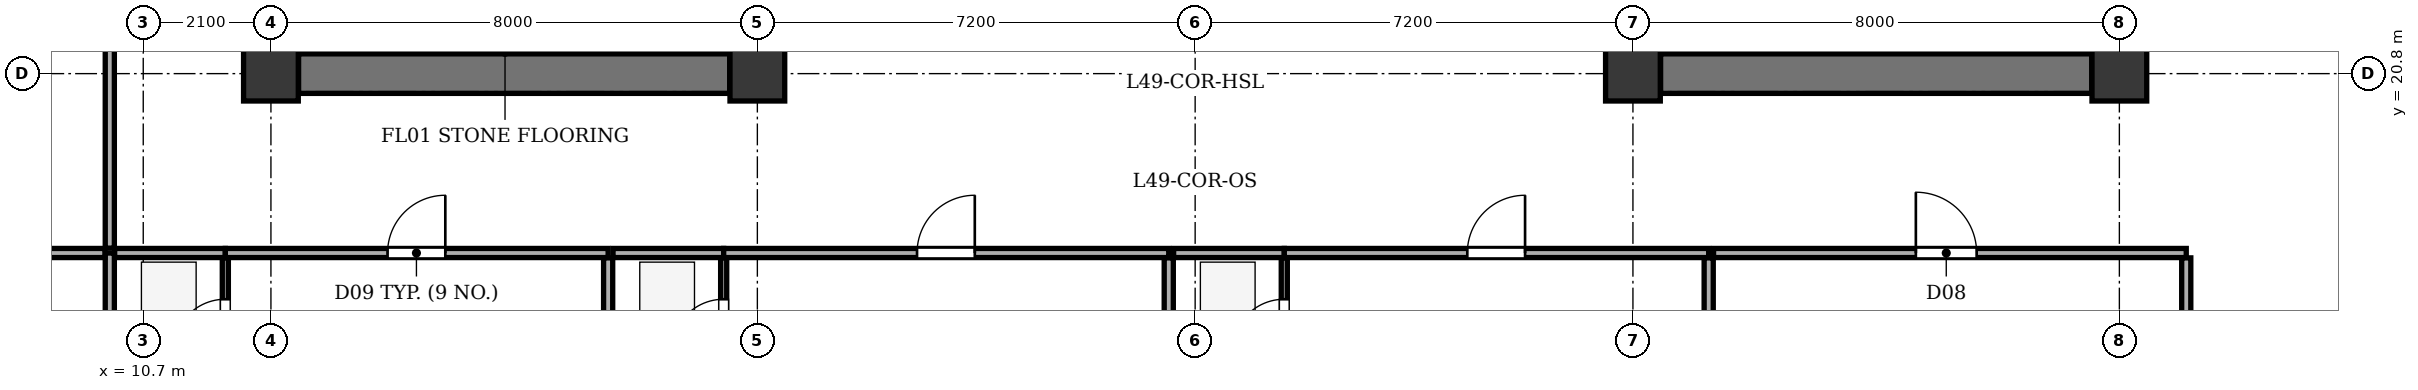
"""IFC4 building model, lengths in metres.
Left out: names, types, materials, properties, quantities, classifications, styles, units other than length and angle.
Written with IfcOpenShell. Run it as: python <this file> out.ifc"""

import sys

from ifc_helpers import new_model, si_unit, direction, frame, frame_2d, origin, origin_2d, place, context, subcontext, project, spatial, rectangle, extrude, element, fill, save


model = new_model("IFC4")
c1 = context("Model", 3, precision=1e-05, world=origin(), true_north=direction((0.0, 1.0)))
c2 = subcontext(c1, "Body", "Model", "MODEL_VIEW")
j1 = project(units=[si_unit("LENGTHUNIT", "METRE"), si_unit("PLANEANGLEUNIT", "RADIAN")], contexts=[c1])
p1 = place(None, origin())
s1 = spatial("IfcSite", under=j1, at=p1, CompositionType="ELEMENT")
p2 = place(p1, origin())
s2 = spatial("IfcBuilding", under=s1, at=p2, CompositionType="ELEMENT")
p3 = place(p2, frame((0.0, 0.0, 190.3)))
s3 = spatial("IfcBuildingStorey", under=s2, at=p3, CompositionType="ELEMENT", Elevation=190.3)
for number, where, z_axis, x_axis in (
    (1, (12.8, 20.8, 0.0), (0.0, 0.0, 1.0), (1.0, 0.0, 0.0)),
    (2, (20.8, 20.8, 0.0), (0.0, 0.0, 1.0), (1.0, 0.0, 0.0)),
    (3, (35.2, 20.8, 0.0), (0.0, 0.0, 1.0), (1.0, 0.0, 0.0)),
    (4, (43.2, 20.8, 0.0), (0.0, 0.0, 1.0), (1.0, 0.0, 0.0)),
):
    element("IfcColumn", number, at=place(p3, frame(where, z_axis=z_axis, x_axis=x_axis)), inside=s3, PredefinedType="COLUMN", context=c2, shape_type="SweptSolid", body=[
        extrude(rectangle(XDim=0.9, YDim=0.9, at=origin_2d()), origin(), (0.0, 0.0, 1.0), 3.5),
    ])
p4 = place(p3, frame((13.255, 20.8, 0.0), z_axis=(0.0, 0.0, 1.0), x_axis=(1.0, 0.0, 0.0)))
e5 = element("IfcWall", 5, at=p4, inside=s3, PredefinedType="SHEAR", context=c2, shape_type="SweptSolid", body=[
    extrude(rectangle(XDim=7.09, YDim=0.65, at=frame_2d((3.545, 0.0))), origin(), (0.0, 0.0, 1.0), 3.2),
])
p5 = place(p3, frame((16.435, 21.135, 0.0), z_axis=(0.0, 0.0, 1.0), x_axis=(0.0, 1.0, 0.0)))
e6 = element("IfcWall", 6, at=p5, inside=s3, PredefinedType="SHEAR", context=c2, shape_type="SweptSolid", body=[
    extrude(rectangle(XDim=12.13, YDim=0.25, at=frame_2d((6.065, 0.0))), origin(), (0.0, 0.0, 1.0), 3.2),
])
p6 = place(p5, frame((0.515, 0.0, 0.0)))
e7 = element("IfcOpeningElement", 7, at=p6, cuts=e6, PredefinedType="OPENING", context=c2, shape_type="SweptSolid", body=[
    extrude(rectangle(XDim=1.2, YDim=2.15, at=frame_2d((0.6, 1.075))), frame((0.0, 0.135, 0.0), z_axis=(0.0, -1.0, 0.0), x_axis=(1.0, 0.0, 0.0)), (0.0, 0.0, 1.0), 0.27),
])
p7 = place(p5, frame((2.665, 0.0, 0.0)))
e8 = element("IfcOpeningElement", 8, at=p7, cuts=e6, PredefinedType="OPENING", context=c2, shape_type="SweptSolid", body=[
    extrude(rectangle(XDim=1.15, YDim=2.15, at=frame_2d((0.575, 1.075))), frame((0.0, 0.135, 0.0), z_axis=(0.0, -1.0, 0.0), x_axis=(1.0, 0.0, 0.0)), (0.0, 0.0, 1.0), 0.27),
])
p8 = place(p3, frame((35.655, 20.8, 0.0), z_axis=(0.0, 0.0, 1.0), x_axis=(1.0, 0.0, 0.0)))
e9 = element("IfcWall", 9, at=p8, inside=s3, PredefinedType="SHEAR", context=c2, shape_type="SweptSolid", body=[
    extrude(rectangle(XDim=7.09, YDim=0.65, at=frame_2d((3.545, 0.0))), origin(), (0.0, 0.0, 1.0), 3.2),
])
p9 = place(p3, frame((39.565, 21.135, 0.0), z_axis=(0.0, 0.0, 1.0), x_axis=(0.0, 1.0, 0.0)))
e10 = element("IfcWall", 10, at=p9, inside=s3, PredefinedType="SHEAR", context=c2, shape_type="SweptSolid", body=[
    extrude(rectangle(XDim=12.13, YDim=0.25, at=frame_2d((6.065, 0.0))), origin(), (0.0, 0.0, 1.0), 3.2),
])
p10 = place(p9, frame((0.515, 0.0, 0.0)))
e11 = element("IfcOpeningElement", 11, at=p10, cuts=e10, PredefinedType="OPENING", context=c2, shape_type="SweptSolid", body=[
    extrude(rectangle(XDim=1.2, YDim=2.15, at=frame_2d((0.6, 1.075))), frame((0.0, 0.135, 0.0), z_axis=(0.0, -1.0, 0.0), x_axis=(1.0, 0.0, 0.0)), (0.0, 0.0, 1.0), 0.27),
])
p11 = place(p9, frame((2.665, 0.0, 0.0)))
e12 = element("IfcOpeningElement", 12, at=p11, cuts=e10, PredefinedType="OPENING", context=c2, shape_type="SweptSolid", body=[
    extrude(rectangle(XDim=1.15, YDim=2.15, at=frame_2d((0.575, 1.075))), frame((0.0, 0.135, 0.0), z_axis=(0.0, -1.0, 0.0), x_axis=(1.0, 0.0, 0.0)), (0.0, 0.0, 1.0), 0.27),
])
p12 = place(p3, frame((10.15, 8.275, 0.0), z_axis=(0.0, 0.0, 1.0), x_axis=(0.0, 1.0, 0.0)))
e13 = element("IfcWall", 13, at=p12, inside=s3, PredefinedType="PARTITIONING", context=c2, shape_type="SweptSolid", body=[
    extrude(rectangle(XDim=9.575, YDim=0.15, at=frame_2d((4.788, 0.0))), origin(), (0.0, 0.0, 1.0), 3.2),
])
p13 = place(p3, frame((10.23, 17.85, 0.0), z_axis=(0.0, 0.0, 1.0), x_axis=(1.0, 0.0, 0.0)))
e14 = element("IfcWall", 14, at=p13, inside=s3, PredefinedType="PARTITIONING", context=c2, shape_type="SweptSolid", body=[
    extrude(rectangle(XDim=1.82, YDim=0.15, at=frame_2d((0.91, 0.0))), origin(), (0.0, 0.0, 1.0), 3.2),
])
p14 = place(p3, frame((12.05, 17.85, 0.0), z_axis=(0.0, 0.0, 1.0), x_axis=(1.0, 0.0, 0.0)))
e15 = element("IfcWall", 15, at=p14, inside=s3, PredefinedType="PARTITIONING", context=c2, shape_type="SweptSolid", body=[
    extrude(rectangle(XDim=6.296, YDim=0.15, at=frame_2d((3.148, 0.0))), origin(), (0.0, 0.0, 1.0), 3.2),
])
p15 = place(p14, frame((2.668, 0.0, 0.0)))
e16 = element("IfcOpeningElement", 16, at=p15, cuts=e15, PredefinedType="OPENING", context=c2, shape_type="SweptSolid", body=[
    extrude(rectangle(XDim=0.95, YDim=2.1, at=frame_2d((0.475, 1.05))), frame((0.0, 0.085, 0.0), z_axis=(0.0, -1.0, 0.0), x_axis=(1.0, 0.0, 0.0)), (0.0, 0.0, 1.0), 0.17),
])
p16 = place(p3, frame((12.05, 15.52, 0.0), z_axis=(0.0, 0.0, 1.0), x_axis=(0.0, 1.0, 0.0)))
e17 = element("IfcWall", 17, at=p16, inside=s3, PredefinedType="PARTITIONING", context=c2, shape_type="SweptSolid", body=[
    extrude(rectangle(XDim=2.25, YDim=0.1, at=frame_2d((1.125, 0.0))), origin(), (0.0, 0.0, 1.0), 3.2),
])
p17 = place(p16, frame((0.72, 0.0, 0.0)))
e18 = element("IfcOpeningElement", 18, at=p17, cuts=e17, PredefinedType="OPENING", context=c2, shape_type="SweptSolid", body=[
    extrude(rectangle(XDim=0.85, YDim=2.05, at=frame_2d((0.425, 1.025))), frame((0.0, 0.06, 0.0), z_axis=(0.0, -1.0, 0.0), x_axis=(1.0, 0.0, 0.0)), (0.0, 0.0, 1.0), 0.12),
])
p18 = place(p3, frame((18.346, 8.275, 0.0), z_axis=(0.0, 0.0, 1.0), x_axis=(0.0, 1.0, 0.0)))
e19 = element("IfcWall", 19, at=p18, inside=s3, PredefinedType="PARTITIONING", context=c2, shape_type="SweptSolid", body=[
    extrude(rectangle(XDim=9.495, YDim=0.15, at=frame_2d((4.748, 0.0))), origin(), (0.0, 0.0, 1.0), 3.2),
])
p19 = place(p3, frame((18.426, 17.85, 0.0), z_axis=(0.0, 0.0, 1.0), x_axis=(1.0, 0.0, 0.0)))
e20 = element("IfcWall", 20, at=p19, inside=s3, PredefinedType="PARTITIONING", context=c2, shape_type="SweptSolid", body=[
    extrude(rectangle(XDim=1.82, YDim=0.15, at=frame_2d((0.91, 0.0))), origin(), (0.0, 0.0, 1.0), 3.2),
])
p20 = place(p3, frame((20.246, 17.85, 0.0), z_axis=(0.0, 0.0, 1.0), x_axis=(1.0, 0.0, 0.0)))
e21 = element("IfcWall", 21, at=p20, inside=s3, PredefinedType="PARTITIONING", context=c2, shape_type="SweptSolid", body=[
    extrude(rectangle(XDim=7.32, YDim=0.15, at=frame_2d((3.66, 0.0))), origin(), (0.0, 0.0, 1.0), 3.2),
])
p21 = place(p20, frame((3.18, 0.0, 0.0)))
e22 = element("IfcOpeningElement", 22, at=p21, cuts=e21, PredefinedType="OPENING", context=c2, shape_type="SweptSolid", body=[
    extrude(rectangle(XDim=0.95, YDim=2.1, at=frame_2d((0.475, 1.05))), frame((0.0, 0.085, 0.0), z_axis=(0.0, -1.0, 0.0), x_axis=(1.0, 0.0, 0.0)), (0.0, 0.0, 1.0), 0.17),
])
p22 = place(p3, frame((20.246, 15.52, 0.0), z_axis=(0.0, 0.0, 1.0), x_axis=(0.0, 1.0, 0.0)))
e23 = element("IfcWall", 23, at=p22, inside=s3, PredefinedType="PARTITIONING", context=c2, shape_type="SweptSolid", body=[
    extrude(rectangle(XDim=2.25, YDim=0.1, at=frame_2d((1.125, 0.0))), origin(), (0.0, 0.0, 1.0), 3.2),
])
p23 = place(p22, frame((0.72, 0.0, 0.0)))
e24 = element("IfcOpeningElement", 24, at=p23, cuts=e23, PredefinedType="OPENING", context=c2, shape_type="SweptSolid", body=[
    extrude(rectangle(XDim=0.85, YDim=2.05, at=frame_2d((0.425, 1.025))), frame((0.0, 0.06, 0.0), z_axis=(0.0, -1.0, 0.0), x_axis=(1.0, 0.0, 0.0)), (0.0, 0.0, 1.0), 0.12),
])
p24 = place(p3, frame((27.566, 8.275, 0.0), z_axis=(0.0, 0.0, 1.0), x_axis=(0.0, 1.0, 0.0)))
e25 = element("IfcWall", 25, at=p24, inside=s3, PredefinedType="PARTITIONING", context=c2, shape_type="SweptSolid", body=[
    extrude(rectangle(XDim=9.495, YDim=0.15, at=frame_2d((4.748, 0.0))), origin(), (0.0, 0.0, 1.0), 3.2),
])
p25 = place(p3, frame((27.646, 17.85, 0.0), z_axis=(0.0, 0.0, 1.0), x_axis=(1.0, 0.0, 0.0)))
e26 = element("IfcWall", 26, at=p25, inside=s3, PredefinedType="PARTITIONING", context=c2, shape_type="SweptSolid", body=[
    extrude(rectangle(XDim=1.82, YDim=0.15, at=frame_2d((0.91, 0.0))), origin(), (0.0, 0.0, 1.0), 3.2),
])
p26 = place(p3, frame((29.466, 17.85, 0.0), z_axis=(0.0, 0.0, 1.0), x_axis=(1.0, 0.0, 0.0)))
e27 = element("IfcWall", 27, at=p26, inside=s3, PredefinedType="PARTITIONING", context=c2, shape_type="SweptSolid", body=[
    extrude(rectangle(XDim=6.98, YDim=0.15, at=frame_2d((3.49, 0.0))), origin(), (0.0, 0.0, 1.0), 3.2),
])
p27 = place(p26, frame((3.01, 0.0, 0.0)))
e28 = element("IfcOpeningElement", 28, at=p27, cuts=e27, PredefinedType="OPENING", context=c2, shape_type="SweptSolid", body=[
    extrude(rectangle(XDim=0.95, YDim=2.1, at=frame_2d((0.475, 1.05))), frame((0.0, 0.085, 0.0), z_axis=(0.0, -1.0, 0.0), x_axis=(1.0, 0.0, 0.0)), (0.0, 0.0, 1.0), 0.17),
])
p28 = place(p3, frame((29.466, 15.52, 0.0), z_axis=(0.0, 0.0, 1.0), x_axis=(0.0, 1.0, 0.0)))
e29 = element("IfcWall", 29, at=p28, inside=s3, PredefinedType="PARTITIONING", context=c2, shape_type="SweptSolid", body=[
    extrude(rectangle(XDim=2.25, YDim=0.1, at=frame_2d((1.125, 0.0))), origin(), (0.0, 0.0, 1.0), 3.2),
])
p29 = place(p28, frame((0.72, 0.0, 0.0)))
e30 = element("IfcOpeningElement", 30, at=p29, cuts=e29, PredefinedType="OPENING", context=c2, shape_type="SweptSolid", body=[
    extrude(rectangle(XDim=0.85, YDim=2.05, at=frame_2d((0.425, 1.025))), frame((0.0, 0.06, 0.0), z_axis=(0.0, -1.0, 0.0), x_axis=(1.0, 0.0, 0.0)), (0.0, 0.0, 1.0), 0.12),
])
p30 = place(p3, frame((36.446, 8.275, 0.0), z_axis=(0.0, 0.0, 1.0), x_axis=(0.0, 1.0, 0.0)))
e31 = element("IfcWall", 31, at=p30, inside=s3, PredefinedType="PARTITIONING", context=c2, shape_type="SweptSolid", body=[
    extrude(rectangle(XDim=9.495, YDim=0.15, at=frame_2d((4.748, 0.0))), origin(), (0.0, 0.0, 1.0), 3.2),
])
p31 = place(p3, frame((36.526, 17.85, 0.0), z_axis=(0.0, 0.0, 1.0), x_axis=(1.0, 0.0, 0.0)))
e32 = element("IfcWall", 32, at=p31, inside=s3, PredefinedType="PARTITIONING", context=c2, shape_type="SweptSolid", body=[
    extrude(rectangle(XDim=7.774, YDim=0.15, at=frame_2d((3.887, 0.0))), origin(), (0.0, 0.0, 1.0), 3.2),
])
p32 = place(p31, frame((3.327, 0.0, 0.0)))
e33 = element("IfcOpeningElement", 33, at=p32, cuts=e32, PredefinedType="OPENING", context=c2, shape_type="SweptSolid", body=[
    extrude(rectangle(XDim=1.0, YDim=2.1, at=frame_2d((0.5, 1.05))), frame((0.0, 0.085, 0.0), z_axis=(0.0, -1.0, 0.0), x_axis=(1.0, 0.0, 0.0)), (0.0, 0.0, 1.0), 0.17),
])
p33 = place(p3, frame((44.3, 8.275, 0.0), z_axis=(0.0, 0.0, 1.0), x_axis=(0.0, 1.0, 0.0)))
e34 = element("IfcWall", 34, at=p33, inside=s3, PredefinedType="PARTITIONING", context=c2, shape_type="SweptSolid", body=[
    extrude(rectangle(XDim=9.495, YDim=0.15, at=frame_2d((4.748, 0.0))), origin(), (0.0, 0.0, 1.0), 3.2),
])
p34 = place(p3, frame((4.675, 17.85, 0.0), z_axis=(0.0, 0.0, 1.0), x_axis=(1.0, 0.0, 0.0)))
e35 = element("IfcWall", 35, at=p34, inside=s3, PredefinedType="PARTITIONING", context=c2, shape_type="SweptSolid", body=[
    extrude(rectangle(XDim=5.395, YDim=0.15, at=frame_2d((2.698, 0.0))), origin(), (0.0, 0.0, 1.0), 3.2),
])
p35 = place(p3, frame((10.15, 17.93, 0.0), z_axis=(0.0, 0.0, 1.0), x_axis=(0.0, 1.0, 0.0)))
e36 = element("IfcWall", 36, at=p35, inside=s3, PredefinedType="PARTITIONING", context=c2, shape_type="SweptSolid", body=[
    extrude(rectangle(XDim=18.54, YDim=0.15, at=frame_2d((9.27, 0.0))), origin(), (0.0, 0.0, 1.0), 3.2),
])
p36 = place(p35, frame((8.79, 0.0, 0.0)))
e37 = element("IfcOpeningElement", 37, at=p36, cuts=e36, PredefinedType="OPENING", context=c2, shape_type="SweptSolid", body=[
    extrude(rectangle(XDim=0.95, YDim=2.1, at=frame_2d((0.475, 1.05))), frame((0.0, 0.085, 0.0), z_axis=(0.0, -1.0, 0.0), x_axis=(1.0, 0.0, 0.0)), (0.0, 0.0, 1.0), 0.17),
])
p37 = place(p17, origin())
e38 = element("IfcDoor", 38, at=p37, inside=s3, OperationType="SINGLE_SWING_LEFT", PredefinedType="DOOR", context=c2, shape_type="SweptSolid", body=[
    extrude(rectangle(XDim=0.85, YDim=2.05, at=frame_2d((0.425, 1.025))), frame((0.0, 0.025, 0.0), z_axis=(0.0, -1.0, 0.0), x_axis=(1.0, 0.0, 0.0)), (0.0, 0.0, 1.0), 0.05),
])
fill(e18, e38)
p38 = place(p15, origin())
e39 = element("IfcDoor", 39, at=p38, inside=s3, OperationType="SINGLE_SWING_RIGHT", PredefinedType="DOOR", context=c2, shape_type="SweptSolid", body=[
    extrude(rectangle(XDim=0.95, YDim=2.1, at=frame_2d((0.475, 1.05))), frame((0.0, 0.025, 0.0), z_axis=(0.0, -1.0, 0.0), x_axis=(1.0, 0.0, 0.0)), (0.0, 0.0, 1.0), 0.05),
])
fill(e16, e39)
p39 = place(p23, origin())
e40 = element("IfcDoor", 40, at=p39, inside=s3, OperationType="SINGLE_SWING_LEFT", PredefinedType="DOOR", context=c2, shape_type="SweptSolid", body=[
    extrude(rectangle(XDim=0.85, YDim=2.05, at=frame_2d((0.425, 1.025))), frame((0.0, 0.025, 0.0), z_axis=(0.0, -1.0, 0.0), x_axis=(1.0, 0.0, 0.0)), (0.0, 0.0, 1.0), 0.05),
])
fill(e24, e40)
p40 = place(p21, origin())
e41 = element("IfcDoor", 41, at=p40, inside=s3, OperationType="SINGLE_SWING_RIGHT", PredefinedType="DOOR", context=c2, shape_type="SweptSolid", body=[
    extrude(rectangle(XDim=0.95, YDim=2.1, at=frame_2d((0.475, 1.05))), frame((0.0, 0.025, 0.0), z_axis=(0.0, -1.0, 0.0), x_axis=(1.0, 0.0, 0.0)), (0.0, 0.0, 1.0), 0.05),
])
fill(e22, e41)
p41 = place(p29, origin())
e42 = element("IfcDoor", 42, at=p41, inside=s3, OperationType="SINGLE_SWING_LEFT", PredefinedType="DOOR", context=c2, shape_type="SweptSolid", body=[
    extrude(rectangle(XDim=0.85, YDim=2.05, at=frame_2d((0.425, 1.025))), frame((0.0, 0.025, 0.0), z_axis=(0.0, -1.0, 0.0), x_axis=(1.0, 0.0, 0.0)), (0.0, 0.0, 1.0), 0.05),
])
fill(e30, e42)
p42 = place(p27, origin())
e43 = element("IfcDoor", 43, at=p42, inside=s3, OperationType="SINGLE_SWING_RIGHT", PredefinedType="DOOR", context=c2, shape_type="SweptSolid", body=[
    extrude(rectangle(XDim=0.95, YDim=2.1, at=frame_2d((0.475, 1.05))), frame((0.0, 0.025, 0.0), z_axis=(0.0, -1.0, 0.0), x_axis=(1.0, 0.0, 0.0)), (0.0, 0.0, 1.0), 0.05),
])
fill(e28, e43)
p43 = place(p32, origin())
e44 = element("IfcDoor", 44, at=p43, inside=s3, OperationType="SINGLE_SWING_LEFT", PredefinedType="DOOR", context=c2, shape_type="SweptSolid", body=[
    extrude(rectangle(XDim=1.0, YDim=2.1, at=frame_2d((0.5, 1.05))), frame((0.0, 0.025, 0.0), z_axis=(0.0, -1.0, 0.0), x_axis=(1.0, 0.0, 0.0)), (0.0, 0.0, 1.0), 0.05),
])
fill(e33, e44)
save(model, sys.argv[1])
